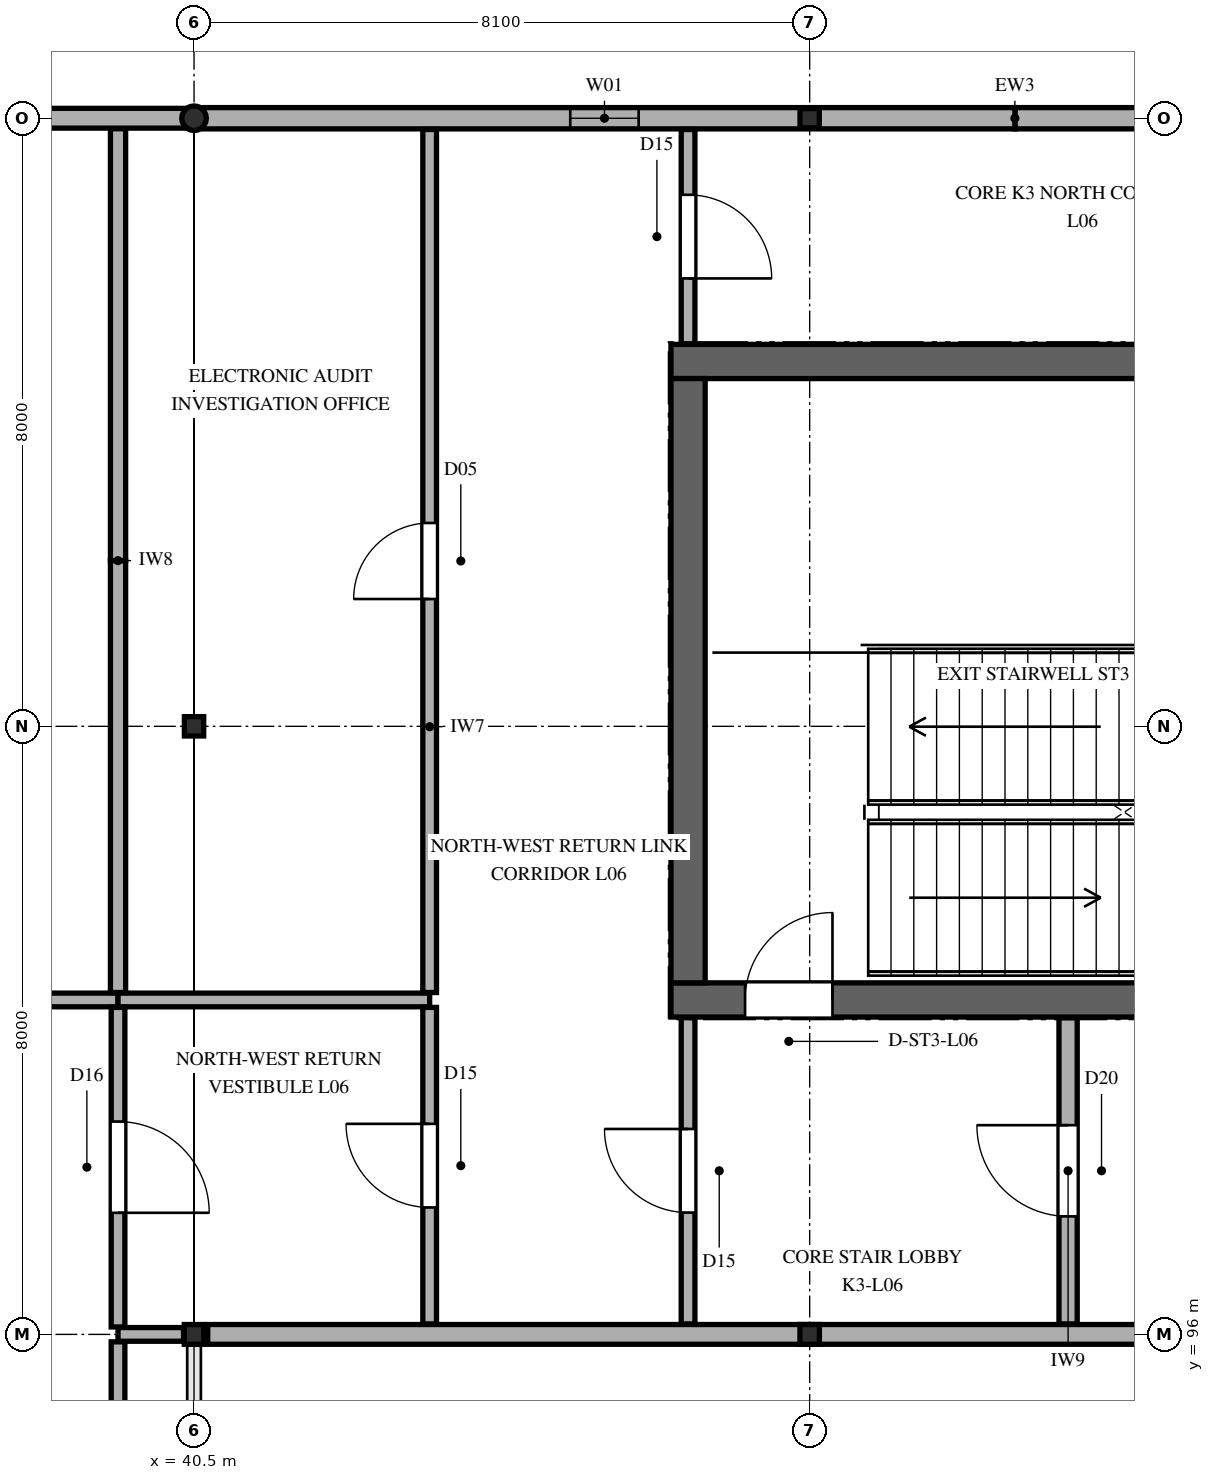
"""IFC4 building model, lengths in metres.
Left out: names, types, materials, properties, quantities, classifications, styles, units other than length and angle.
Written with IfcOpenShell. Run it as: python <this file> out.ifc"""

import sys

from ifc_helpers import new_model, si_unit, direction, frame, frame_2d, origin, origin_2d, place, context, subcontext, project, spatial, rectangle, hollow_rectangle, hollow_circle, i_section, extrude, element, fill, save


model = new_model("IFC4")
c1 = context("Model", 3, precision=1e-05, world=origin(), true_north=direction((0.0, 1.0)))
c2 = subcontext(c1, "Body", "Model", "MODEL_VIEW")
j1 = project(units=[si_unit("LENGTHUNIT", "METRE"), si_unit("PLANEANGLEUNIT", "RADIAN")], contexts=[c1])
p1 = place(None, origin())
s1 = spatial("IfcSite", under=j1, at=p1, CompositionType="ELEMENT")
p2 = place(p1, origin())
s2 = spatial("IfcBuilding", under=s1, at=p2, CompositionType="ELEMENT")
p3 = place(p2, frame((0.0, 0.0, 29.1)))
s3 = spatial("IfcBuildingStorey", under=s2, at=p3, CompositionType="ELEMENT", Elevation=29.1)
p4 = place(p3, frame((46.775, 100.4, 0.0), z_axis=(0.0, 0.0, 1.0), x_axis=(1.0, 0.0, 0.0)))
e1 = element("IfcWall", 1, at=p4, inside=s3, PredefinedType="SHEAR", context=c2, shape_type="SweptSolid", body=[
    extrude(rectangle(XDim=15.25, YDim=0.45, at=frame_2d((7.625, 0.0))), origin(), (0.0, 0.0, 1.0), 4.2),
])
p5 = place(p4, frame((0.975, 0.0, 0.0)))
e2 = element("IfcOpeningElement", 2, at=p5, cuts=e1, PredefinedType="OPENING", context=c2, shape_type="SweptSolid", body=[
    extrude(rectangle(XDim=1.15, YDim=2.25, at=frame_2d((0.575, 1.125))), frame((0.0, 0.235, 0.0), z_axis=(0.0, -1.0, 0.0), x_axis=(1.0, 0.0, 0.0)), (0.0, 0.0, 1.0), 0.47),
])
p6 = place(p4, frame((10.258, 0.0, 0.0)))
e3 = element("IfcOpeningElement", 3, at=p6, cuts=e1, PredefinedType="OPENING", context=c2, shape_type="SweptSolid", body=[
    extrude(rectangle(XDim=1.1, YDim=2.2, at=frame_2d((0.55, 1.1))), frame((0.0, 0.235, 0.0), z_axis=(0.0, -1.0, 0.0), x_axis=(1.0, 0.0, 0.0)), (0.0, 0.0, 1.0), 0.47),
])
p7 = place(p4, frame((12.972, 0.0, 0.0)))
e4 = element("IfcOpeningElement", 4, at=p7, cuts=e1, PredefinedType="OPENING", context=c2, shape_type="SweptSolid", body=[
    extrude(rectangle(XDim=1.1, YDim=2.2, at=frame_2d((0.55, 1.1))), frame((0.0, 0.235, 0.0), z_axis=(0.0, -1.0, 0.0), x_axis=(1.0, 0.0, 0.0)), (0.0, 0.0, 1.0), 0.47),
])
p8 = place(p3, frame((46.775, 108.8, 0.0), z_axis=(0.0, 0.0, 1.0), x_axis=(1.0, 0.0, 0.0)))
e5 = element("IfcWall", 5, at=p8, inside=s3, PredefinedType="SHEAR", context=c2, shape_type="SweptSolid", body=[
    extrude(rectangle(XDim=15.25, YDim=0.45, at=frame_2d((7.625, 0.0))), origin(), (0.0, 0.0, 1.0), 4.2),
])
p9 = place(p3, frame((47.0, 100.625, 0.0), z_axis=(0.0, 0.0, 1.0), x_axis=(0.0, 1.0, 0.0)))
e6 = element("IfcWall", 6, at=p9, inside=s3, PredefinedType="SHEAR", context=c2, shape_type="SweptSolid", body=[
    extrude(rectangle(XDim=7.95, YDim=0.45, at=frame_2d((3.975, 0.0))), origin(), (0.0, 0.0, 1.0), 4.2),
])
p10 = place(p3, frame((40.5, 96.0, 0.0), z_axis=(0.0, 0.0, 1.0), x_axis=(1.0, 0.0, 0.0)))
e7 = element("IfcColumn", 7, at=p10, inside=s3, PredefinedType="COLUMN", context=c2, shape_type="SweptSolid", body=[
    extrude(i_section(OverallWidth=0.256, OverallDepth=0.26, WebThickness=0.011, FlangeThickness=0.017, FilletRadius=0.013, at=origin_2d()), origin(), (0.0, 0.0, 1.0), 4.2),
])
p11 = place(p3, frame((40.5, 104.0, 0.0), z_axis=(0.0, 0.0, 1.0), x_axis=(1.0, 0.0, 0.0)))
e8 = element("IfcColumn", 8, at=p11, inside=s3, PredefinedType="COLUMN", context=c2, shape_type="SweptSolid", body=[
    extrude(hollow_rectangle(XDim=0.254, YDim=0.254, WallThickness=0.013, InnerFilletRadius=0.013, OuterFilletRadius=0.025, at=origin_2d()), origin(), (0.0, 0.0, 1.0), 4.2),
])
p12 = place(p3, frame((40.5, 112.0, 0.0), z_axis=(0.0, 0.0, 1.0), x_axis=(1.0, 0.0, 0.0)))
e9 = element("IfcColumn", 9, at=p12, inside=s3, PredefinedType="COLUMN", context=c2, shape_type="SweptSolid", body=[
    extrude(hollow_circle(Radius=0.162, WallThickness=0.013, at=origin_2d()), origin(), (0.0, 0.0, 1.0), 4.2),
])
p13 = place(p3, frame((48.6, 96.0, 0.0), z_axis=(0.0, 0.0, 1.0), x_axis=(1.0, 0.0, 0.0)))
e10 = element("IfcColumn", 10, at=p13, inside=s3, PredefinedType="COLUMN", context=c2, shape_type="SweptSolid", body=[
    extrude(i_section(OverallWidth=0.256, OverallDepth=0.26, WebThickness=0.011, FlangeThickness=0.017, FilletRadius=0.013, at=origin_2d()), origin(), (0.0, 0.0, 1.0), 4.2),
])
p14 = place(p3, frame((48.6, 112.0, 0.0), z_axis=(0.0, 0.0, 1.0), x_axis=(1.0, 0.0, 0.0)))
e11 = element("IfcColumn", 11, at=p14, inside=s3, PredefinedType="COLUMN", context=c2, shape_type="SweptSolid", body=[
    extrude(hollow_rectangle(XDim=0.254, YDim=0.254, WallThickness=0.013, InnerFilletRadius=0.013, OuterFilletRadius=0.025, at=origin_2d()), origin(), (0.0, 0.0, 1.0), 4.2),
])
p15 = place(p3, frame((40.68, 96.0, 0.0), z_axis=(0.0, 0.0, 1.0), x_axis=(1.0, 0.0, 0.0)))
e12 = element("IfcWall", 12, at=p15, inside=s3, PredefinedType="SOLIDWALL", context=c2, shape_type="SweptSolid", body=[
    extrude(rectangle(XDim=16.11, YDim=0.26, at=frame_2d((8.055, 0.0))), origin(), (0.0, 0.0, 1.0), 3.402),
])
p16 = place(p3, frame((62.1, 112.0, 0.0), z_axis=(0.0, 0.0, 1.0), x_axis=(-1.0, 0.0, 0.0)))
e13 = element("IfcWall", 13, at=p16, inside=s3, PredefinedType="SOLIDWALL", context=c2, shape_type="SweptSolid", body=[
    extrude(rectangle(XDim=10.8, YDim=0.28, at=frame_2d((5.4, 0.0))), origin(), (0.0, 0.0, 1.0), 3.302),
])
p17 = place(p16, frame((2.7, 0.0, 0.95)))
e14 = element("IfcOpeningElement", 14, at=p17, cuts=e13, PredefinedType="OPENING", context=c2, shape_type="SweptSolid", body=[
    extrude(rectangle(XDim=1.6, YDim=1.4, at=frame_2d((0.8, 0.7))), frame((0.0, 0.15, 0.0), z_axis=(0.0, -1.0, 0.0), x_axis=(1.0, 0.0, 0.0)), (0.0, 0.0, 1.0), 0.3),
])
p18 = place(p3, frame((51.3, 112.0, 0.0), z_axis=(0.0, 0.0, 1.0), x_axis=(-1.0, 0.0, 0.0)))
e15 = element("IfcWall", 15, at=p18, inside=s3, PredefinedType="SOLIDWALL", context=c2, shape_type="SweptSolid", body=[
    extrude(rectangle(XDim=10.8, YDim=0.28, at=frame_2d((5.4, 0.0))), origin(), (0.0, 0.0, 1.0), 3.402),
])
p19 = place(p18, frame((4.95, 0.0, 0.95)))
e16 = element("IfcOpeningElement", 16, at=p19, cuts=e15, PredefinedType="OPENING", context=c2, shape_type="SweptSolid", body=[
    extrude(rectangle(XDim=0.9, YDim=1.8, at=frame_2d((0.45, 0.9))), frame((0.0, 0.15, 0.0), z_axis=(0.0, -1.0, 0.0), x_axis=(1.0, 0.0, 0.0)), (0.0, 0.0, 1.0), 0.3),
])
p20 = place(p3, frame((40.5, 112.0, 0.0), z_axis=(0.0, 0.0, 1.0), x_axis=(-1.0, 0.0, 0.0)))
e17 = element("IfcWall", 17, at=p20, inside=s3, PredefinedType="SOLIDWALL", context=c2, shape_type="SweptSolid", body=[
    extrude(rectangle(XDim=12.15, YDim=0.26, at=frame_2d((6.075, 0.0))), origin(), (0.0, 0.0, 1.0), 3.402),
])
p21 = place(p20, frame((5.4, 0.0, 0.85)))
e18 = element("IfcOpeningElement", 18, at=p21, cuts=e17, PredefinedType="OPENING", context=c2, shape_type="SweptSolid", body=[
    extrude(rectangle(XDim=0.9, YDim=2.1, at=frame_2d((0.45, 1.05))), frame((0.0, 0.14, 0.0), z_axis=(0.0, -1.0, 0.0), x_axis=(1.0, 0.0, 0.0)), (0.0, 0.0, 1.0), 0.28),
])
p22 = place(p3, frame((36.2, 100.4, 0.0), z_axis=(0.0, 0.0, 1.0), x_axis=(1.0, 0.0, 0.0)))
e19 = element("IfcWall", 19, at=p22, inside=s3, PredefinedType="PARTITIONING", context=c2, shape_type="SweptSolid", body=[
    extrude(rectangle(XDim=3.3, YDim=0.18, at=frame_2d((1.65, 0.0))), origin(), (0.0, 0.0, 1.0), 3.96),
])
p23 = place(p3, frame((39.5, 96.0, 0.0), z_axis=(0.0, 0.0, 1.0), x_axis=(1.0, 0.0, 0.0)))
e20 = element("IfcWall", 20, at=p23, inside=s3, PredefinedType="PARTITIONING", context=c2, shape_type="SweptSolid", body=[
    extrude(rectangle(XDim=0.862, YDim=0.18, at=frame_2d((0.431, 0.0))), origin(), (0.0, 0.0, 1.0), 3.402),
])
p24 = place(p3, frame((39.5, 100.4, 0.0), z_axis=(0.0, 0.0, 1.0), x_axis=(1.0, 0.0, 0.0)))
e21 = element("IfcWall", 21, at=p24, inside=s3, PredefinedType="PARTITIONING", context=c2, shape_type="SweptSolid", body=[
    extrude(rectangle(XDim=4.1, YDim=0.18, at=frame_2d((2.05, 0.0))), origin(), (0.0, 0.0, 1.0), 3.96),
])
p25 = place(p3, frame((39.5, 89.65, 0.0), z_axis=(0.0, 0.0, 1.0), x_axis=(0.0, 1.0, 0.0)))
e22 = element("IfcWall", 22, at=p25, inside=s3, PredefinedType="PARTITIONING", context=c2, shape_type="SweptSolid", body=[
    extrude(rectangle(XDim=6.252, YDim=0.18, at=frame_2d((3.126, 0.0))), origin(), (0.0, 0.0, 1.0), 3.96),
])
p26 = place(p3, frame((39.5, 96.098, 0.0), z_axis=(0.0, 0.0, 1.0), x_axis=(0.0, 1.0, 0.0)))
e23 = element("IfcWall", 23, at=p26, inside=s3, PredefinedType="PARTITIONING", context=c2, shape_type="SweptSolid", body=[
    extrude(rectangle(XDim=4.204, YDim=0.18, at=frame_2d((2.102, 0.0))), origin(), (0.0, 0.0, 1.0), 3.96),
])
p27 = place(p26, frame((1.502, 0.0, 0.0)))
e24 = element("IfcOpeningElement", 24, at=p27, cuts=e23, PredefinedType="OPENING", context=c2, shape_type="SweptSolid", body=[
    extrude(rectangle(XDim=1.2, YDim=2.2, at=frame_2d((0.6, 1.1))), frame((0.0, 0.1, 0.0), z_axis=(0.0, -1.0, 0.0), x_axis=(1.0, 0.0, 0.0)), (0.0, 0.0, 1.0), 0.2),
])
p28 = place(p3, frame((39.5, 100.498, 0.0), z_axis=(0.0, 0.0, 1.0), x_axis=(0.0, 1.0, 0.0)))
e25 = element("IfcWall", 25, at=p28, inside=s3, PredefinedType="PARTITIONING", context=c2, shape_type="SweptSolid", body=[
    extrude(rectangle(XDim=5.682, YDim=0.2, at=frame_2d((2.841, 0.0))), origin(), (0.0, 0.0, 1.0), 3.96),
])
p29 = place(p3, frame((39.5, 106.18, 0.0), z_axis=(0.0, 0.0, 1.0), x_axis=(0.0, 1.0, 0.0)))
e26 = element("IfcWall", 26, at=p29, inside=s3, PredefinedType="PARTITIONING", context=c2, shape_type="SweptSolid", body=[
    extrude(rectangle(XDim=5.682, YDim=0.2, at=frame_2d((2.841, 0.0))), origin(), (0.0, 0.0, 1.0), 3.96),
])
p30 = place(p3, frame((43.6, 96.138, 0.0), z_axis=(0.0, 0.0, 1.0), x_axis=(0.0, 1.0, 0.0)))
e27 = element("IfcWall", 27, at=p30, inside=s3, PredefinedType="PARTITIONING", context=c2, shape_type="SweptSolid", body=[
    extrude(rectangle(XDim=4.164, YDim=0.18, at=frame_2d((2.082, 0.0))), origin(), (0.0, 0.0, 1.0), 3.96),
])
p31 = place(p30, frame((1.532, 0.0, 0.0)))
e28 = element("IfcOpeningElement", 28, at=p31, cuts=e27, PredefinedType="OPENING", context=c2, shape_type="SweptSolid", body=[
    extrude(rectangle(XDim=1.1, YDim=2.2, at=frame_2d((0.55, 1.1))), frame((0.0, 0.1, 0.0), z_axis=(0.0, -1.0, 0.0), x_axis=(1.0, 0.0, 0.0)), (0.0, 0.0, 1.0), 0.2),
])
p32 = place(p3, frame((43.6, 100.498, 0.0), z_axis=(0.0, 0.0, 1.0), x_axis=(0.0, 1.0, 0.0)))
e29 = element("IfcWall", 29, at=p32, inside=s3, PredefinedType="PARTITIONING", context=c2, shape_type="SweptSolid", body=[
    extrude(rectangle(XDim=11.354, YDim=0.18, at=frame_2d((5.677, 0.0))), origin(), (0.0, 0.0, 1.0), 3.96),
])
p33 = place(p32, frame((5.177, 0.0, 0.0)))
e30 = element("IfcOpeningElement", 30, at=p33, cuts=e29, PredefinedType="OPENING", context=c2, shape_type="SweptSolid", body=[
    extrude(rectangle(XDim=1.0, YDim=2.2, at=frame_2d((0.5, 1.1))), frame((0.0, 0.1, 0.0), z_axis=(0.0, -1.0, 0.0), x_axis=(1.0, 0.0, 0.0)), (0.0, 0.0, 1.0), 0.2),
])
p34 = place(p3, frame((47.0, 96.138, 0.0), z_axis=(0.0, 0.0, 1.0), x_axis=(0.0, 1.0, 0.0)))
e31 = element("IfcWall", 31, at=p34, inside=s3, PredefinedType="PARTITIONING", context=c2, shape_type="SweptSolid", body=[
    extrude(rectangle(XDim=4.029, YDim=0.18, at=frame_2d((2.015, 0.0))), origin(), (0.0, 0.0, 1.0), 3.96),
])
p35 = place(p34, frame((1.465, 0.0, 0.0)))
e32 = element("IfcOpeningElement", 32, at=p35, cuts=e31, PredefinedType="OPENING", context=c2, shape_type="SweptSolid", body=[
    extrude(rectangle(XDim=1.1, YDim=2.2, at=frame_2d((0.55, 1.1))), frame((0.0, 0.1, 0.0), z_axis=(0.0, -1.0, 0.0), x_axis=(1.0, 0.0, 0.0)), (0.0, 0.0, 1.0), 0.2),
])
p36 = place(p3, frame((47.0, 109.033, 0.0), z_axis=(0.0, 0.0, 1.0), x_axis=(0.0, 1.0, 0.0)))
e33 = element("IfcWall", 33, at=p36, inside=s3, PredefinedType="PARTITIONING", context=c2, shape_type="SweptSolid", body=[
    extrude(rectangle(XDim=2.819, YDim=0.18, at=frame_2d((1.41, 0.0))), origin(), (0.0, 0.0, 1.0), 3.96),
])
p37 = place(p36, frame((0.86, 0.0, 0.0)))
e34 = element("IfcOpeningElement", 34, at=p37, cuts=e33, PredefinedType="OPENING", context=c2, shape_type="SweptSolid", body=[
    extrude(rectangle(XDim=1.1, YDim=2.2, at=frame_2d((0.55, 1.1))), frame((0.0, 0.1, 0.0), z_axis=(0.0, -1.0, 0.0), x_axis=(1.0, 0.0, 0.0)), (0.0, 0.0, 1.0), 0.2),
])
p38 = place(p3, frame((52.0, 96.138, 0.0), z_axis=(0.0, 0.0, 1.0), x_axis=(0.0, 1.0, 0.0)))
e35 = element("IfcWall", 35, at=p38, inside=s3, PredefinedType="PARTITIONING", context=c2, shape_type="SweptSolid", body=[
    extrude(rectangle(XDim=4.029, YDim=0.24, at=frame_2d((2.015, 0.0))), origin(), (0.0, 0.0, 1.0), 3.96),
])
p39 = place(p38, frame((1.415, 0.0, 0.0)))
e36 = element("IfcOpeningElement", 36, at=p39, cuts=e35, PredefinedType="OPENING", context=c2, shape_type="SweptSolid", body=[
    extrude(rectangle(XDim=1.2, YDim=2.3, at=frame_2d((0.6, 1.15))), frame((0.0, 0.13, 0.0), z_axis=(0.0, -1.0, 0.0), x_axis=(1.0, 0.0, 0.0)), (0.0, 0.0, 1.0), 0.26),
])
p40 = place(p19, origin())
e37 = element("IfcWindow", 37, at=p40, inside=s3, PartitioningType="SINGLE_PANEL", PredefinedType="WINDOW", context=c2, shape_type="SweptSolid", body=[
    extrude(rectangle(XDim=0.9, YDim=1.8, at=frame_2d((0.45, 0.9))), frame((0.0, 0.03, 0.0), z_axis=(0.0, -1.0, 0.0), x_axis=(1.0, 0.0, 0.0)), (0.0, 0.0, 1.0), 0.06),
])
fill(e16, e37)
p41 = place(p5, origin())
e38 = element("IfcDoor", 38, at=p41, inside=s3, OperationType="SINGLE_SWING_RIGHT", PredefinedType="DOOR", context=c2, shape_type="SweptSolid", body=[
    extrude(rectangle(XDim=1.15, YDim=2.25, at=frame_2d((0.575, 1.125))), frame((0.0, 0.025, 0.0), z_axis=(0.0, -1.0, 0.0), x_axis=(1.0, 0.0, 0.0)), (0.0, 0.0, 1.0), 0.05),
])
fill(e2, e38)
p42 = place(p27, frame((1.2, 0.0, 0.0), z_axis=(0.0, 0.0, 1.0), x_axis=(-1.0, 0.0, 0.0)))
e39 = element("IfcDoor", 39, at=p42, inside=s3, OperationType="SINGLE_SWING_LEFT", PredefinedType="DOOR", context=c2, shape_type="SweptSolid", body=[
    extrude(rectangle(XDim=1.2, YDim=2.2, at=frame_2d((0.6, 1.1))), frame((0.0, 0.025, 0.0), z_axis=(0.0, -1.0, 0.0), x_axis=(1.0, 0.0, 0.0)), (0.0, 0.0, 1.0), 0.05),
])
fill(e24, e39)
p43 = place(p31, origin())
e40 = element("IfcDoor", 40, at=p43, inside=s3, OperationType="SINGLE_SWING_RIGHT", PredefinedType="DOOR", context=c2, shape_type="SweptSolid", body=[
    extrude(rectangle(XDim=1.1, YDim=2.2, at=frame_2d((0.55, 1.1))), frame((0.0, 0.025, 0.0), z_axis=(0.0, -1.0, 0.0), x_axis=(1.0, 0.0, 0.0)), (0.0, 0.0, 1.0), 0.05),
])
fill(e28, e40)
p44 = place(p33, origin())
e41 = element("IfcDoor", 41, at=p44, inside=s3, OperationType="SINGLE_SWING_LEFT", PredefinedType="DOOR", context=c2, shape_type="SweptSolid", body=[
    extrude(rectangle(XDim=1.0, YDim=2.2, at=frame_2d((0.5, 1.1))), frame((0.0, 0.025, 0.0), z_axis=(0.0, -1.0, 0.0), x_axis=(1.0, 0.0, 0.0)), (0.0, 0.0, 1.0), 0.05),
])
fill(e30, e41)
p45 = place(p35, origin())
e42 = element("IfcDoor", 42, at=p45, inside=s3, OperationType="SINGLE_SWING_RIGHT", PredefinedType="DOOR", context=c2, shape_type="SweptSolid", body=[
    extrude(rectangle(XDim=1.1, YDim=2.2, at=frame_2d((0.55, 1.1))), frame((0.0, 0.025, 0.0), z_axis=(0.0, -1.0, 0.0), x_axis=(1.0, 0.0, 0.0)), (0.0, 0.0, 1.0), 0.05),
])
fill(e32, e42)
p46 = place(p37, frame((1.1, 0.0, 0.0), z_axis=(0.0, 0.0, 1.0), x_axis=(-1.0, 0.0, 0.0)))
e43 = element("IfcDoor", 43, at=p46, inside=s3, OperationType="SINGLE_SWING_LEFT", PredefinedType="DOOR", context=c2, shape_type="SweptSolid", body=[
    extrude(rectangle(XDim=1.1, YDim=2.2, at=frame_2d((0.55, 1.1))), frame((0.0, 0.025, 0.0), z_axis=(0.0, -1.0, 0.0), x_axis=(1.0, 0.0, 0.0)), (0.0, 0.0, 1.0), 0.05),
])
fill(e34, e43)
p47 = place(p39, origin())
e44 = element("IfcDoor", 44, at=p47, inside=s3, OperationType="SINGLE_SWING_RIGHT", PredefinedType="DOOR", context=c2, shape_type="SweptSolid", body=[
    extrude(rectangle(XDim=1.2, YDim=2.3, at=frame_2d((0.6, 1.15))), frame((0.0, 0.025, 0.0), z_axis=(0.0, -1.0, 0.0), x_axis=(1.0, 0.0, 0.0)), (0.0, 0.0, 1.0), 0.05),
])
fill(e36, e44)
save(model, sys.argv[1])
